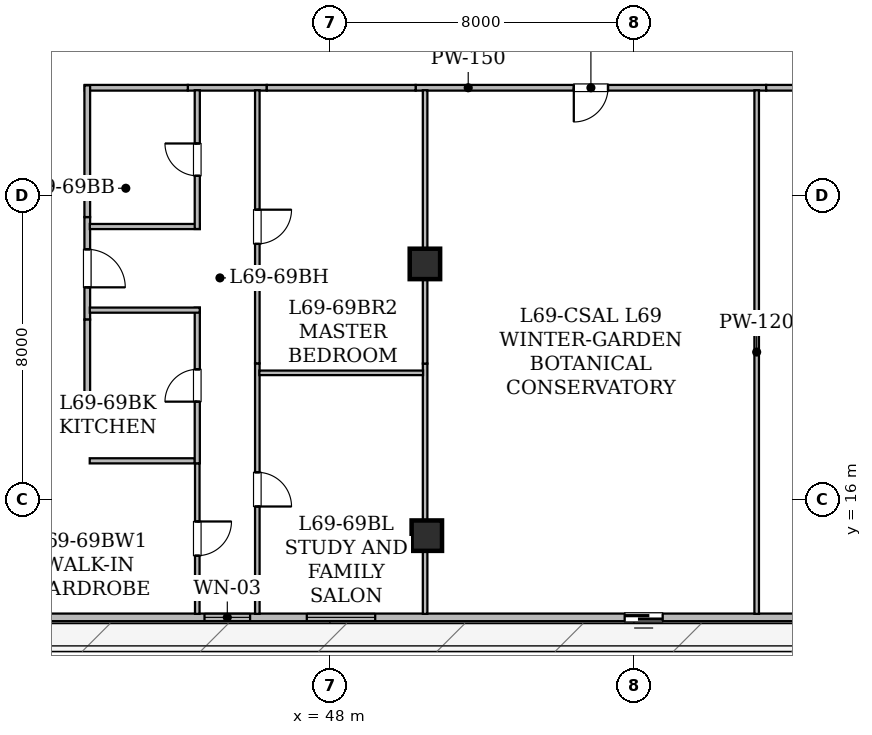
"""IFC4 building model, lengths in metres.
Left out: names, types, materials, properties, quantities, classifications, styles, units other than length and angle.
Written with IfcOpenShell. Run it as: python <this file> out.ifc"""

import sys

from ifc_helpers import new_model, si_unit, direction, frame, frame_2d, origin, origin_2d, place, context, subcontext, project, spatial, rectangle, hollow_rectangle, extrude, element, fill, save


model = new_model("IFC4")
c1 = context("Model", 3, precision=1e-05, world=origin(), true_north=direction((0.0, 1.0)))
c2 = subcontext(c1, "Body", "Model", "MODEL_VIEW")
j1 = project(units=[si_unit("LENGTHUNIT", "METRE"), si_unit("PLANEANGLEUNIT", "RADIAN")], contexts=[c1])
p1 = place(None, origin())
s1 = spatial("IfcSite", under=j1, at=p1, CompositionType="ELEMENT")
p2 = place(p1, origin())
s2 = spatial("IfcBuilding", under=s1, at=p2, CompositionType="ELEMENT")
p3 = place(p2, frame((0.0, 0.0, 269.45)))
s3 = spatial("IfcBuildingStorey", under=s2, at=p3, CompositionType="ELEMENT", Elevation=269.45)
for number, where, z_axis, x_axis in (
    (1, (50.55, 15.05, 0.025), (0.0, 0.0, 1.0), (1.0, 0.0, 0.0)),
    (2, (50.5, 22.2, 0.025), (0.0, 0.0, 1.0), (1.0, 0.0, 0.0)),
):
    element("IfcColumn", number, at=place(p3, frame(where, z_axis=z_axis, x_axis=x_axis)), inside=s3, PredefinedType="COLUMN", context=c2, shape_type="SweptSolid", body=[
        extrude(hollow_rectangle(XDim=0.8, YDim=0.8, WallThickness=0.04, at=origin_2d()), origin(), (0.0, 0.0, 1.0), 4.175),
    ])
p4 = place(p3, frame((64.296, 12.9, 0.0), z_axis=(0.0, 0.0, 1.0), x_axis=(-1.0, 0.0, 0.0)))
e3 = element("IfcWall", 3, at=p4, inside=s3, PredefinedType="STANDARD", context=c2, shape_type="SweptSolid", body=[
    extrude(rectangle(XDim=38.593, YDim=0.2, at=frame_2d((19.296, 0.0))), origin(), (0.0, 0.0, 1.0), 3.95),
])
p5 = place(p4, frame((7.54, 0.0, 0.0)))
e4 = element("IfcOpeningElement", 4, at=p5, cuts=e3, PredefinedType="OPENING", context=c2, shape_type="SweptSolid", body=[
    extrude(rectangle(XDim=1.0, YDim=2.15, at=frame_2d((0.5, 1.075))), frame((0.0, 0.11, 0.0), z_axis=(0.0, -1.0, 0.0), x_axis=(1.0, 0.0, 0.0)), (0.0, 0.0, 1.0), 0.22),
])
p6 = place(p4, frame((18.396, 0.0, 0.78)))
e5 = element("IfcOpeningElement", 5, at=p6, cuts=e3, PredefinedType="OPENING", context=c2, shape_type="SweptSolid", body=[
    extrude(rectangle(XDim=1.2, YDim=1.5, at=frame_2d((0.6, 0.75))), frame((0.0, 0.11, 0.0), z_axis=(0.0, -1.0, 0.0), x_axis=(1.0, 0.0, 0.0)), (0.0, 0.0, 1.0), 0.22),
])
p7 = place(p4, frame((15.104, 0.0, 0.85)))
e6 = element("IfcOpeningElement", 6, at=p7, cuts=e3, PredefinedType="OPENING", context=c2, shape_type="SweptSolid", body=[
    extrude(rectangle(XDim=1.8, YDim=0.92, at=frame_2d((0.9, 0.46))), frame((0.0, 0.11, 0.0), z_axis=(0.0, -1.0, 0.0), x_axis=(1.0, 0.0, 0.0)), (0.0, 0.0, 1.0), 0.22),
])
p8 = place(p3, frame((59.479, 26.835, 0.0), z_axis=(0.0, 0.0, 1.0), x_axis=(-1.0, 0.0, 0.0)))
e7 = element("IfcWall", 7, at=p8, inside=s3, PredefinedType="STANDARD", context=c2, shape_type="SweptSolid", body=[
    extrude(rectangle(XDim=9.223, YDim=0.15, at=frame_2d((4.611, 0.0))), origin(), (0.0, 0.0, 1.0), 3.245),
])
p9 = place(p8, frame((4.161, 0.0, 0.0)))
e8 = element("IfcOpeningElement", 8, at=p9, cuts=e7, PredefinedType="OPENING", context=c2, shape_type="SweptSolid", body=[
    extrude(rectangle(XDim=0.9, YDim=2.1, at=frame_2d((0.45, 1.05))), frame((0.0, 0.085, 0.0), z_axis=(0.0, -1.0, 0.0), x_axis=(1.0, 0.0, 0.0)), (0.0, 0.0, 1.0), 0.17),
])
p10 = place(p3, frame((63.69, 26.835, 0.0), z_axis=(0.0, 0.0, 1.0), x_axis=(-1.0, 0.0, 0.0)))
e9 = element("IfcWall", 9, at=p10, inside=s3, PredefinedType="STANDARD", context=c2, shape_type="SweptSolid", body=[
    extrude(rectangle(XDim=4.211, YDim=0.15, at=frame_2d((2.105, 0.0))), origin(), (0.0, 0.0, 1.0), 3.95),
])
p11 = place(p10, frame((1.531, 0.0, 0.0)))
e10 = element("IfcOpeningElement", 10, at=p11, cuts=e9, PredefinedType="OPENING", context=c2, shape_type="SweptSolid", body=[
    extrude(rectangle(XDim=1.15, YDim=2.2, at=frame_2d((0.575, 1.1))), frame((0.0, 0.085, 0.0), z_axis=(0.0, -1.0, 0.0), x_axis=(1.0, 0.0, 0.0)), (0.0, 0.0, 1.0), 0.17),
])
p12 = place(p3, frame((46.339, 26.835, 0.0), z_axis=(0.0, 0.0, 1.0), x_axis=(-1.0, 0.0, 0.0)))
e11 = element("IfcWall", 11, at=p12, inside=s3, PredefinedType="STANDARD", context=c2, shape_type="SweptSolid", body=[
    extrude(rectangle(XDim=2.078, YDim=0.15, at=frame_2d((1.039, 0.0))), origin(), (0.0, 0.0, 1.0), 3.95),
])
p13 = place(p3, frame((41.615, 23.433, 0.0), z_axis=(0.0, 0.0, 1.0), x_axis=(0.0, -1.0, 0.0)))
e12 = element("IfcWall", 12, at=p13, inside=s3, PredefinedType="STANDARD", context=c2, shape_type="SweptSolid", body=[
    extrude(rectangle(XDim=2.698, YDim=0.15, at=frame_2d((1.349, 0.0))), origin(), (0.0, 0.0, 1.0), 3.95),
])
p14 = place(p13, frame((0.849, 0.0, 0.0)))
e13 = element("IfcOpeningElement", 13, at=p14, cuts=e12, PredefinedType="OPENING", context=c2, shape_type="SweptSolid", body=[
    extrude(rectangle(XDim=1.0, YDim=2.15, at=frame_2d((0.5, 1.075))), frame((0.0, 0.085, 0.0), z_axis=(0.0, -1.0, 0.0), x_axis=(1.0, 0.0, 0.0)), (0.0, 0.0, 1.0), 0.17),
])
p15 = place(p3, frame((44.261, 26.835, 0.0), z_axis=(0.0, 0.0, 1.0), x_axis=(-1.0, 0.0, 0.0)))
e14 = element("IfcWall", 14, at=p15, inside=s3, PredefinedType="STANDARD", context=c2, shape_type="SweptSolid", body=[
    extrude(rectangle(XDim=2.711, YDim=0.15, at=frame_2d((1.355, 0.0))), origin(), (0.0, 0.0, 1.0), 3.95),
])
p16 = place(p3, frame((41.615, 26.898, 0.0), z_axis=(0.0, 0.0, 1.0), x_axis=(0.0, -1.0, 0.0)))
e15 = element("IfcWall", 15, at=p16, inside=s3, PredefinedType="STANDARD", context=c2, shape_type="SweptSolid", body=[
    extrude(rectangle(XDim=3.465, YDim=0.15, at=frame_2d((1.732, 0.0))), origin(), (0.0, 0.0, 1.0), 3.245),
])
p17 = place(p3, frame((41.615, 20.735, 0.0), z_axis=(0.0, 0.0, 1.0), x_axis=(0.0, -1.0, 0.0)))
e16 = element("IfcWall", 16, at=p17, inside=s3, PredefinedType="STANDARD", context=c2, shape_type="SweptSolid", body=[
    extrude(rectangle(XDim=3.135, YDim=0.15, at=frame_2d((1.567, 0.0))), origin(), (0.0, 0.0, 1.0), 3.95),
])
p18 = place(p3, frame((50.256, 26.835, 0.0), z_axis=(0.0, 0.0, 1.0), x_axis=(-1.0, 0.0, 0.0)))
e17 = element("IfcWall", 17, at=p18, inside=s3, PredefinedType="STANDARD", context=c2, shape_type="SweptSolid", body=[
    extrude(rectangle(XDim=3.917, YDim=0.15, at=frame_2d((1.958, 0.0))), origin(), (0.0, 0.0, 1.0), 3.95),
])
p19 = place(p3, frame((59.23, 26.77, 0.0), z_axis=(0.0, 0.0, 1.0), x_axis=(0.0, -1.0, 0.0)))
e18 = element("IfcWall", 18, at=p19, inside=s3, PredefinedType="PARTITIONING", context=c2, shape_type="SweptSolid", body=[
    extrude(rectangle(XDim=13.778, YDim=0.12, at=frame_2d((6.889, 0.0))), origin(), (0.0, 0.0, 1.0), 3.245),
])
p20 = place(p3, frame((50.505, 12.992, 0.0), z_axis=(0.0, 0.0, 1.0), x_axis=(0.0, 1.0, 0.0)))
e19 = element("IfcWall", 19, at=p20, inside=s3, PredefinedType="PARTITIONING", context=c2, shape_type="SweptSolid", body=[
    extrude(rectangle(XDim=6.586, YDim=0.12, at=frame_2d((3.293, 0.0))), origin(), (0.0, 0.0, 1.0), 3.245),
])
p21 = place(p3, frame((50.505, 19.578, 0.0), z_axis=(0.0, 0.0, 1.0), x_axis=(0.0, 1.0, 0.0)))
e20 = element("IfcWall", 20, at=p21, inside=s3, PredefinedType="PARTITIONING", context=c2, shape_type="SweptSolid", body=[
    extrude(rectangle(XDim=7.192, YDim=0.12, at=frame_2d((3.596, 0.0))), origin(), (0.0, 0.0, 1.0), 3.245),
])
p22 = place(p3, frame((44.51, 16.954, 0.0), z_axis=(0.0, 0.0, 1.0), x_axis=(0.0, -1.0, 0.0)))
e21 = element("IfcWall", 21, at=p22, inside=s3, PredefinedType="PARTITIONING", context=c2, shape_type="SweptSolid", body=[
    extrude(rectangle(XDim=3.962, YDim=0.12, at=frame_2d((1.981, 0.0))), origin(), (0.0, 0.0, 1.0), 3.407),
])
p23 = place(p22, frame((1.531, 0.0, 0.0)))
e22 = element("IfcOpeningElement", 22, at=p23, cuts=e21, PredefinedType="OPENING", context=c2, shape_type="SweptSolid", body=[
    extrude(rectangle(XDim=0.9, YDim=2.1, at=frame_2d((0.45, 1.05))), frame((0.0, 0.07, 0.0), z_axis=(0.0, -1.0, 0.0), x_axis=(1.0, 0.0, 0.0)), (0.0, 0.0, 1.0), 0.14),
])
p24 = place(p3, frame((41.68, 17.019, 0.0), z_axis=(0.0, 0.0, 1.0), x_axis=(1.0, 0.0, 0.0)))
e23 = element("IfcWall", 23, at=p24, inside=s3, PredefinedType="PARTITIONING", context=c2, shape_type="SweptSolid", body=[
    extrude(rectangle(XDim=2.765, YDim=0.135, at=frame_2d((1.383, 0.0))), origin(), (0.0, 0.0, 1.0), 3.95),
])
p25 = place(p3, frame((41.682, 23.184, 0.0), z_axis=(0.0, 0.0, 1.0), x_axis=(1.0, 0.0, 0.0)))
e24 = element("IfcWall", 24, at=p25, inside=s3, PredefinedType="PARTITIONING", context=c2, shape_type="SweptSolid", body=[
    extrude(rectangle(XDim=2.893, YDim=0.135, at=frame_2d((1.447, 0.0))), origin(), (0.0, 0.0, 1.0), 3.245),
])
p26 = place(p3, frame((44.51, 23.119, 0.0), z_axis=(0.0, 0.0, 1.0), x_axis=(0.0, 1.0, 0.0)))
e25 = element("IfcWall", 25, at=p26, inside=s3, PredefinedType="PARTITIONING", context=c2, shape_type="SweptSolid", body=[
    extrude(rectangle(XDim=3.651, YDim=0.135, at=frame_2d((1.826, 0.0))), origin(), (0.0, 0.0, 1.0), 3.245),
])
p27 = place(p26, frame((1.4, 0.0, 0.0)))
e26 = element("IfcOpeningElement", 26, at=p27, cuts=e25, PredefinedType="OPENING", context=c2, shape_type="SweptSolid", body=[
    extrude(rectangle(XDim=0.85, YDim=2.1, at=frame_2d((0.425, 1.05))), frame((0.0, 0.077, 0.0), z_axis=(0.0, -1.0, 0.0), x_axis=(1.0, 0.0, 0.0)), (0.0, 0.0, 1.0), 0.155),
])
p28 = place(p3, frame((44.51, 16.954, 0.0), z_axis=(0.0, 0.0, 1.0), x_axis=(0.0, 1.0, 0.0)))
e27 = element("IfcWall", 27, at=p28, inside=s3, PredefinedType="PARTITIONING", context=c2, shape_type="SweptSolid", body=[
    extrude(rectangle(XDim=4.095, YDim=0.135, at=frame_2d((2.047, 0.0))), origin(), (0.0, 0.0, 1.0), 3.95),
])
p29 = place(p28, frame((1.622, 0.0, 0.0)))
e28 = element("IfcOpeningElement", 28, at=p29, cuts=e27, PredefinedType="OPENING", context=c2, shape_type="SweptSolid", body=[
    extrude(rectangle(XDim=0.85, YDim=2.1, at=frame_2d((0.425, 1.05))), frame((0.0, 0.077, 0.0), z_axis=(0.0, -1.0, 0.0), x_axis=(1.0, 0.0, 0.0)), (0.0, 0.0, 1.0), 0.155),
])
p30 = place(p3, frame((44.575, 20.984, 0.0), z_axis=(0.0, 0.0, 1.0), x_axis=(-1.0, 0.0, 0.0)))
e29 = element("IfcWall", 29, at=p30, inside=s3, PredefinedType="PARTITIONING", context=c2, shape_type="SweptSolid", body=[
    extrude(rectangle(XDim=2.893, YDim=0.135, at=frame_2d((1.447, 0.0))), origin(), (0.0, 0.0, 1.0), 3.95),
])
p31 = place(p3, frame((46.09, 19.583, 0.0), z_axis=(0.0, 0.0, 1.0), x_axis=(0.0, -1.0, 0.0)))
e30 = element("IfcWall", 30, at=p31, inside=s3, PredefinedType="PARTITIONING", context=c2, shape_type="SweptSolid", body=[
    extrude(rectangle(XDim=6.591, YDim=0.12, at=frame_2d((3.295, 0.0))), origin(), (0.0, 0.0, 1.0), 3.407),
])
p32 = place(p31, frame((2.866, 0.0, 0.0)))
e31 = element("IfcOpeningElement", 31, at=p32, cuts=e30, PredefinedType="OPENING", context=c2, shape_type="SweptSolid", body=[
    extrude(rectangle(XDim=0.9, YDim=2.1, at=frame_2d((0.45, 1.05))), frame((0.0, 0.07, 0.0), z_axis=(0.0, -1.0, 0.0), x_axis=(1.0, 0.0, 0.0)), (0.0, 0.0, 1.0), 0.14),
])
p33 = place(p3, frame((46.09, 26.77, 0.0), z_axis=(0.0, 0.0, 1.0), x_axis=(0.0, -1.0, 0.0)))
e32 = element("IfcWall", 32, at=p33, inside=s3, PredefinedType="PARTITIONING", context=c2, shape_type="SweptSolid", body=[
    extrude(rectangle(XDim=7.187, YDim=0.12, at=frame_2d((3.594, 0.0))), origin(), (0.0, 0.0, 1.0), 3.245),
])
p34 = place(p33, frame((3.143, 0.0, 0.0)))
e33 = element("IfcOpeningElement", 33, at=p34, cuts=e32, PredefinedType="OPENING", context=c2, shape_type="SweptSolid", body=[
    extrude(rectangle(XDim=0.9, YDim=2.1, at=frame_2d((0.45, 1.05))), frame((0.0, 0.07, 0.0), z_axis=(0.0, -1.0, 0.0), x_axis=(1.0, 0.0, 0.0)), (0.0, 0.0, 1.0), 0.14),
])
p35 = place(p3, frame((46.144, 19.334, 0.0), z_axis=(0.0, 0.0, 1.0), x_axis=(1.0, 0.0, 0.0)))
e34 = element("IfcWall", 34, at=p35, inside=s3, PredefinedType="PARTITIONING", context=c2, shape_type="SweptSolid", body=[
    extrude(rectangle(XDim=4.307, YDim=0.12, at=frame_2d((2.153, 0.0))), origin(), (0.0, 0.0, 1.0), 3.245),
])
p36 = place(p5, origin())
e35 = element("IfcDoor", 35, at=p36, inside=s3, OperationType="SLIDING_TO_LEFT", PredefinedType="DOOR", context=c2, shape_type="SweptSolid", body=[
    extrude(rectangle(XDim=1.0, YDim=2.15, at=frame_2d((0.5, 1.075))), frame((0.0, 0.025, 0.0), z_axis=(0.0, -1.0, 0.0), x_axis=(1.0, 0.0, 0.0)), (0.0, 0.0, 1.0), 0.05),
])
fill(e4, e35)
p37 = place(p6, origin())
e36 = element("IfcWindow", 36, at=p37, inside=s3, PartitioningType="SINGLE_PANEL", PredefinedType="WINDOW", context=c2, shape_type="SweptSolid", body=[
    extrude(rectangle(XDim=1.2, YDim=1.5, at=frame_2d((0.6, 0.75))), frame((0.0, 0.03, 0.0), z_axis=(0.0, -1.0, 0.0), x_axis=(1.0, 0.0, 0.0)), (0.0, 0.0, 1.0), 0.06),
])
fill(e5, e36)
p38 = place(p7, origin())
e37 = element("IfcWindow", 37, at=p38, inside=s3, PartitioningType="SINGLE_PANEL", PredefinedType="WINDOW", context=c2, shape_type="SweptSolid", body=[
    extrude(rectangle(XDim=1.8, YDim=0.92, at=frame_2d((0.9, 0.46))), frame((0.0, 0.03, 0.0), z_axis=(0.0, -1.0, 0.0), x_axis=(1.0, 0.0, 0.0)), (0.0, 0.0, 1.0), 0.06),
])
fill(e6, e37)
p39 = place(p9, origin())
e38 = element("IfcDoor", 38, at=p39, inside=s3, OperationType="SINGLE_SWING_RIGHT", PredefinedType="DOOR", context=c2, shape_type="SweptSolid", body=[
    extrude(rectangle(XDim=0.9, YDim=2.1, at=frame_2d((0.45, 1.05))), frame((0.0, 0.025, 0.0), z_axis=(0.0, -1.0, 0.0), x_axis=(1.0, 0.0, 0.0)), (0.0, 0.0, 1.0), 0.05),
])
fill(e8, e38)
p40 = place(p14, origin())
e39 = element("IfcDoor", 39, at=p40, inside=s3, OperationType="SINGLE_SWING_RIGHT", PredefinedType="DOOR", context=c2, shape_type="SweptSolid", body=[
    extrude(rectangle(XDim=1.0, YDim=2.15, at=frame_2d((0.5, 1.075))), frame((0.0, 0.025, 0.0), z_axis=(0.0, -1.0, 0.0), x_axis=(1.0, 0.0, 0.0)), (0.0, 0.0, 1.0), 0.05),
])
fill(e13, e39)
p41 = place(p23, origin())
e40 = element("IfcDoor", 40, at=p41, inside=s3, OperationType="SINGLE_SWING_LEFT", PredefinedType="DOOR", context=c2, shape_type="SweptSolid", body=[
    extrude(rectangle(XDim=0.9, YDim=2.1, at=frame_2d((0.45, 1.05))), frame((0.0, 0.025, 0.0), z_axis=(0.0, -1.0, 0.0), x_axis=(1.0, 0.0, 0.0)), (0.0, 0.0, 1.0), 0.05),
])
fill(e22, e40)
p42 = place(p27, origin())
e41 = element("IfcDoor", 41, at=p42, inside=s3, OperationType="SINGLE_SWING_RIGHT", PredefinedType="DOOR", context=c2, shape_type="SweptSolid", body=[
    extrude(rectangle(XDim=0.85, YDim=2.1, at=frame_2d((0.425, 1.05))), frame((0.0, 0.025, 0.0), z_axis=(0.0, -1.0, 0.0), x_axis=(1.0, 0.0, 0.0)), (0.0, 0.0, 1.0), 0.05),
])
fill(e26, e41)
p43 = place(p29, origin())
e42 = element("IfcDoor", 42, at=p43, inside=s3, OperationType="SINGLE_SWING_LEFT", PredefinedType="DOOR", context=c2, shape_type="SweptSolid", body=[
    extrude(rectangle(XDim=0.85, YDim=2.1, at=frame_2d((0.425, 1.05))), frame((0.0, 0.025, 0.0), z_axis=(0.0, -1.0, 0.0), x_axis=(1.0, 0.0, 0.0)), (0.0, 0.0, 1.0), 0.05),
])
fill(e28, e42)
p44 = place(p32, origin())
e43 = element("IfcDoor", 43, at=p44, inside=s3, OperationType="SINGLE_SWING_RIGHT", PredefinedType="DOOR", context=c2, shape_type="SweptSolid", body=[
    extrude(rectangle(XDim=0.9, YDim=2.1, at=frame_2d((0.45, 1.05))), frame((0.0, 0.025, 0.0), z_axis=(0.0, -1.0, 0.0), x_axis=(1.0, 0.0, 0.0)), (0.0, 0.0, 1.0), 0.05),
])
fill(e31, e43)
p45 = place(p34, origin())
e44 = element("IfcDoor", 44, at=p45, inside=s3, OperationType="SINGLE_SWING_LEFT", PredefinedType="DOOR", context=c2, shape_type="SweptSolid", body=[
    extrude(rectangle(XDim=0.9, YDim=2.1, at=frame_2d((0.45, 1.05))), frame((0.0, 0.025, 0.0), z_axis=(0.0, -1.0, 0.0), x_axis=(1.0, 0.0, 0.0)), (0.0, 0.0, 1.0), 0.05),
])
fill(e33, e44)
save(model, sys.argv[1])
